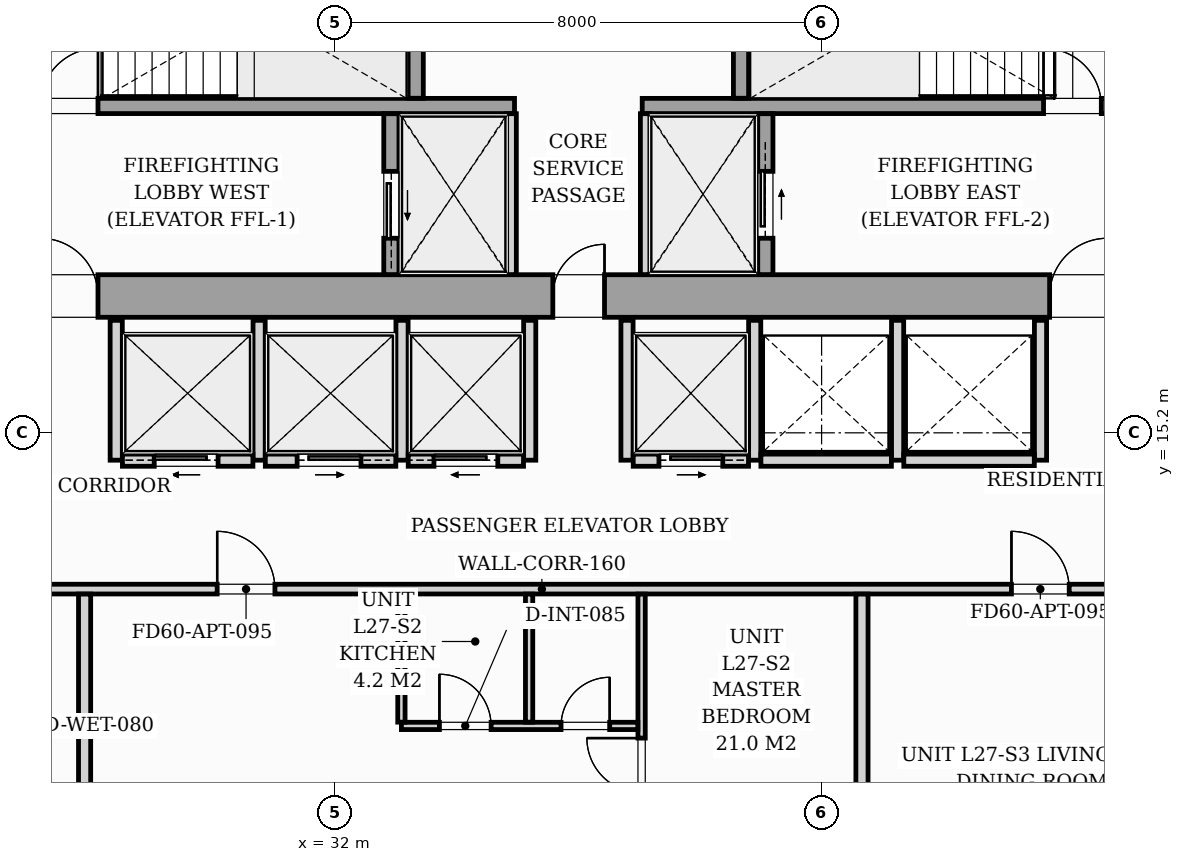
"""IFC4 building model, lengths in metres.
Left out: names, types, materials, properties, quantities, classifications, styles, units other than length and angle.
Written with IfcOpenShell. Run it as: python <this file> out.ifc"""

import sys

from ifc_helpers import new_model, si_unit, direction, frame, frame_2d, origin, origin_2d, place, context, subcontext, project, spatial, rectangle, i_section, extrude, source, transform, mapped, element, fill, save


model = new_model("IFC4")
c1 = context("Model", 3, precision=1e-05, world=origin(), true_north=direction((0.0, 1.0)))
c2 = subcontext(c1, "Body", "Model", "MODEL_VIEW")
j1 = project(units=[si_unit("LENGTHUNIT", "METRE"), si_unit("PLANEANGLEUNIT", "RADIAN")], contexts=[c1])
p1 = place(None, origin())
s1 = spatial("IfcSite", under=j1, at=p1, CompositionType="ELEMENT")
p2 = place(p1, origin())
s2 = spatial("IfcBuilding", under=s1, at=p2, CompositionType="ELEMENT")
p3 = place(p2, frame((0.0, 0.0, 97.0)))
s3 = spatial("IfcBuildingStorey", under=s2, at=p3, CompositionType="ELEMENT", Elevation=97.0)
m1 = source(origin(), c2, "Body", "SweptSolid", [
    extrude(i_section(OverallWidth=0.427, OverallDepth=0.483, WebThickness=0.051, FlangeThickness=0.082, FilletRadius=0.018, at=origin_2d()), origin(), (0.0, 0.0, 1.0), 3.196),
])
for number, where, z_axis, x_axis in (
    (1, (33.12, 17.4, 0.002), (0.0, 0.0, 1.0), (1.0, 0.0, 0.0)),
    (2, (38.88, 17.4, 0.002), (0.0, 0.0, 1.0), (1.0, 0.0, 0.0)),
):
    element("IfcColumn", number, at=place(p3, frame(where, z_axis=z_axis, x_axis=x_axis)), inside=s3, PredefinedType="PILASTER", context=c2, shape_type="MappedRepresentation", body=[
        mapped(m1, transform((0.0, 0.0, 0.0), scale=1.0)),
    ])
p4 = place(p3, frame((26.1, 17.45, 0.0), z_axis=(0.0, 0.0, 1.0), x_axis=(1.0, 0.0, 0.0)))
e3 = element("IfcWall", 3, at=p4, inside=s3, PredefinedType="SHEAR", context=c2, shape_type="SweptSolid", body=[
    extrude(rectangle(XDim=19.8, YDim=0.7, at=frame_2d((9.9, 0.0))), origin(), (0.0, 0.0, 1.0), 3.2),
])
p5 = place(p4, frame((1.05, 0.0, 0.0)))
e4 = element("IfcOpeningElement", 4, at=p5, cuts=e3, PredefinedType="OPENING", context=c2, shape_type="SweptSolid", body=[
    extrude(rectangle(XDim=0.95, YDim=2.06, at=frame_2d((0.475, 1.03))), frame((0.0, 0.36, 0.0), z_axis=(0.0, -1.0, 0.0), x_axis=(1.0, 0.0, 0.0)), (0.0, 0.0, 1.0), 0.72),
])
p6 = place(p4, frame((9.48, 0.0, 0.0)))
e5 = element("IfcOpeningElement", 5, at=p6, cuts=e3, PredefinedType="OPENING", context=c2, shape_type="SweptSolid", body=[
    extrude(rectangle(XDim=0.85, YDim=2.0, at=frame_2d((0.425, 1.0))), frame((0.0, 0.36, 0.0), z_axis=(0.0, -1.0, 0.0), x_axis=(1.0, 0.0, 0.0)), (0.0, 0.0, 1.0), 0.72),
])
p7 = place(p4, frame((17.65, 0.0, 0.0)))
e6 = element("IfcOpeningElement", 6, at=p7, cuts=e3, PredefinedType="OPENING", context=c2, shape_type="SweptSolid", body=[
    extrude(rectangle(XDim=0.95, YDim=2.06, at=frame_2d((0.475, 1.03))), frame((0.0, 0.36, 0.0), z_axis=(0.0, -1.0, 0.0), x_axis=(1.0, 0.0, 0.0)), (0.0, 0.0, 1.0), 0.72),
])
p8 = place(p3, frame((26.802, 20.575, 0.0), z_axis=(0.0, 0.0, 1.0), x_axis=(1.0, 0.0, 0.0)))
e7 = element("IfcWall", 7, at=p8, inside=s3, PredefinedType="SOLIDWALL", context=c2, shape_type="SweptSolid", body=[
    extrude(rectangle(XDim=8.148, YDim=0.25, at=frame_2d((4.074, 0.0))), origin(), (0.0, 0.0, 1.0), 3.2),
])
p9 = place(p8, frame((0.348, 0.0, 0.0)))
e8 = element("IfcOpeningElement", 8, at=p9, cuts=e7, PredefinedType="OPENING", context=c2, shape_type="SweptSolid", body=[
    extrude(rectangle(XDim=0.95, YDim=2.06, at=frame_2d((0.475, 1.03))), frame((0.0, 0.135, 0.0), z_axis=(0.0, -1.0, 0.0), x_axis=(1.0, 0.0, 0.0)), (0.0, 0.0, 1.0), 0.27),
])
p10 = place(p3, frame((37.05, 20.575, 0.0), z_axis=(0.0, 0.0, 1.0), x_axis=(1.0, 0.0, 0.0)))
e9 = element("IfcWall", 9, at=p10, inside=s3, PredefinedType="SOLIDWALL", context=c2, shape_type="SweptSolid", body=[
    extrude(rectangle(XDim=8.148, YDim=0.25, at=frame_2d((4.074, 0.0))), origin(), (0.0, 0.0, 1.0), 3.2),
])
p11 = place(p10, frame((6.6, 0.0, 0.0)))
e10 = element("IfcOpeningElement", 10, at=p11, cuts=e9, PredefinedType="OPENING", context=c2, shape_type="SweptSolid", body=[
    extrude(rectangle(XDim=0.95, YDim=2.06, at=frame_2d((0.475, 1.03))), frame((0.0, 0.135, 0.0), z_axis=(0.0, -1.0, 0.0), x_axis=(1.0, 0.0, 0.0)), (0.0, 0.0, 1.0), 0.27),
])
for number, where, z_axis, x_axis in (
    (11, (33.325, 20.702, 0.0), (0.0, 0.0, 1.0), (0.0, 1.0, 0.0)),
    (12, (38.675, 20.702, 0.0), (0.0, 0.0, 1.0), (0.0, 1.0, 0.0)),
):
    element("IfcWall", number, at=place(p3, frame(where, z_axis=z_axis, x_axis=x_axis)), inside=s3, PredefinedType="SOLIDWALL", context=c2, shape_type="SweptSolid", body=[
        extrude(rectangle(XDim=2.896, YDim=0.25, at=frame_2d((1.448, 0.0))), origin(), (0.0, 0.0, 1.0), 3.2),
    ])
p12 = place(p3, frame((32.925, 17.802, 0.0), z_axis=(0.0, 0.0, 1.0), x_axis=(0.0, 1.0, 0.0)))
e13 = element("IfcWall", 13, at=p12, inside=s3, PredefinedType="SOLIDWALL", context=c2, shape_type="SweptSolid", body=[
    extrude(rectangle(XDim=2.646, YDim=0.25, at=frame_2d((1.323, 0.0))), origin(), (0.0, 0.0, 1.0), 3.2),
])
p13 = place(p12, frame((0.598, 0.0, 0.0)))
e14 = element("IfcOpeningElement", 14, at=p13, cuts=e13, PredefinedType="OPENING", context=c2, shape_type="SweptSolid", body=[
    extrude(rectangle(XDim=1.1, YDim=2.08, at=frame_2d((0.55, 1.04))), frame((0.0, 0.135, 0.0), z_axis=(0.0, -1.0, 0.0), x_axis=(1.0, 0.0, 0.0)), (0.0, 0.0, 1.0), 0.27),
])
for number, where, z_axis, x_axis in (
    (15, (34.9, 17.802, 0.0), (0.0, 0.0, 1.0), (0.0, 1.0, 0.0)),
    (16, (37.1, 17.802, 0.0), (0.0, 0.0, 1.0), (0.0, 1.0, 0.0)),
):
    element("IfcWall", number, at=place(p3, frame(where, z_axis=z_axis, x_axis=x_axis)), inside=s3, PredefinedType="PARTITIONING", context=c2, shape_type="SweptSolid", body=[
        extrude(rectangle(XDim=2.646, YDim=0.16, at=frame_2d((1.323, 0.0))), origin(), (0.0, 0.0, 1.0), 2.94),
    ])
p14 = place(p3, frame((39.075, 17.802, 0.0), z_axis=(0.0, 0.0, 1.0), x_axis=(0.0, 1.0, 0.0)))
e17 = element("IfcWall", 17, at=p14, inside=s3, PredefinedType="SOLIDWALL", context=c2, shape_type="SweptSolid", body=[
    extrude(rectangle(XDim=2.646, YDim=0.25, at=frame_2d((1.323, 0.0))), origin(), (0.0, 0.0, 1.0), 3.2),
])
p15 = place(p14, frame((0.598, 0.0, 0.0)))
e18 = element("IfcOpeningElement", 18, at=p15, cuts=e17, PredefinedType="OPENING", context=c2, shape_type="SweptSolid", body=[
    extrude(rectangle(XDim=1.1, YDim=2.08, at=frame_2d((0.55, 1.04))), frame((0.0, 0.135, 0.0), z_axis=(0.0, -1.0, 0.0), x_axis=(1.0, 0.0, 0.0)), (0.0, 0.0, 1.0), 0.27),
])
for number, where, z_axis, x_axis in (
    (19, (28.4, 14.75, 0.0), (0.0, 0.0, 1.0), (0.0, 1.0, 0.0)),
    (20, (30.75, 14.75, 0.0), (0.0, 0.0, 1.0), (0.0, 1.0, 0.0)),
    (21, (33.1, 14.75, 0.0), (0.0, 0.0, 1.0), (0.0, 1.0, 0.0)),
):
    element("IfcWall", number, at=place(p3, frame(where, z_axis=z_axis, x_axis=x_axis)), inside=s3, PredefinedType="PARTITIONING", context=c2, shape_type="SweptSolid", body=[
        extrude(rectangle(XDim=2.3, YDim=0.2, at=frame_2d((1.15, 0.0))), origin(), (0.0, 0.0, 1.0), 2.94),
    ])
p16 = place(p3, frame((28.502, 14.75, 0.0), z_axis=(0.0, 0.0, 1.0), x_axis=(1.0, 0.0, 0.0)))
e22 = element("IfcWall", 22, at=p16, inside=s3, PredefinedType="PARTITIONING", context=c2, shape_type="SweptSolid", body=[
    extrude(rectangle(XDim=2.146, YDim=0.2, at=frame_2d((1.073, 0.0))), origin(), (0.0, 0.0, 1.0), 2.94),
])
p17 = place(p16, frame((0.523, 0.0, 0.0)))
e23 = element("IfcOpeningElement", 23, at=p17, cuts=e22, PredefinedType="OPENING", context=c2, shape_type="SweptSolid", body=[
    extrude(rectangle(XDim=1.05, YDim=2.08, at=frame_2d((0.525, 1.04))), frame((0.0, 0.11, 0.0), z_axis=(0.0, -1.0, 0.0), x_axis=(1.0, 0.0, 0.0)), (0.0, 0.0, 1.0), 0.22),
])
p18 = place(p3, frame((30.852, 14.75, 0.0), z_axis=(0.0, 0.0, 1.0), x_axis=(1.0, 0.0, 0.0)))
e24 = element("IfcWall", 24, at=p18, inside=s3, PredefinedType="PARTITIONING", context=c2, shape_type="SweptSolid", body=[
    extrude(rectangle(XDim=2.146, YDim=0.2, at=frame_2d((1.073, 0.0))), origin(), (0.0, 0.0, 1.0), 2.94),
])
p19 = place(p18, frame((0.523, 0.0, 0.0)))
e25 = element("IfcOpeningElement", 25, at=p19, cuts=e24, PredefinedType="OPENING", context=c2, shape_type="SweptSolid", body=[
    extrude(rectangle(XDim=1.05, YDim=2.08, at=frame_2d((0.525, 1.04))), frame((0.0, 0.11, 0.0), z_axis=(0.0, -1.0, 0.0), x_axis=(1.0, 0.0, 0.0)), (0.0, 0.0, 1.0), 0.22),
])
p20 = place(p3, frame((35.2, 14.75, 0.0), z_axis=(0.0, 0.0, 1.0), x_axis=(0.0, 1.0, 0.0)))
e26 = element("IfcWall", 26, at=p20, inside=s3, PredefinedType="PARTITIONING", context=c2, shape_type="SweptSolid", body=[
    extrude(rectangle(XDim=2.3, YDim=0.2, at=frame_2d((1.15, 0.0))), origin(), (0.0, 0.0, 1.0), 2.94),
])
p21 = place(p3, frame((33.202, 14.75, 0.0), z_axis=(0.0, 0.0, 1.0), x_axis=(1.0, 0.0, 0.0)))
e27 = element("IfcWall", 27, at=p21, inside=s3, PredefinedType="PARTITIONING", context=c2, shape_type="SweptSolid", body=[
    extrude(rectangle(XDim=1.896, YDim=0.2, at=frame_2d((0.948, 0.0))), origin(), (0.0, 0.0, 1.0), 2.94),
])
p22 = place(p21, frame((0.423, 0.0, 0.0)))
e28 = element("IfcOpeningElement", 28, at=p22, cuts=e27, PredefinedType="OPENING", context=c2, shape_type="SweptSolid", body=[
    extrude(rectangle(XDim=1.05, YDim=2.08, at=frame_2d((0.525, 1.04))), frame((0.0, 0.11, 0.0), z_axis=(0.0, -1.0, 0.0), x_axis=(1.0, 0.0, 0.0)), (0.0, 0.0, 1.0), 0.22),
])
for number, where, z_axis, x_axis in (
    (29, (36.8, 14.75, 0.0), (0.0, 0.0, 1.0), (0.0, 1.0, 0.0)),
    (30, (38.9, 14.75, 0.0), (0.0, 0.0, 1.0), (0.0, 1.0, 0.0)),
):
    element("IfcWall", number, at=place(p3, frame(where, z_axis=z_axis, x_axis=x_axis)), inside=s3, PredefinedType="PARTITIONING", context=c2, shape_type="SweptSolid", body=[
        extrude(rectangle(XDim=2.3, YDim=0.2, at=frame_2d((1.15, 0.0))), origin(), (0.0, 0.0, 1.0), 2.94),
    ])
p23 = place(p3, frame((36.902, 14.75, 0.0), z_axis=(0.0, 0.0, 1.0), x_axis=(1.0, 0.0, 0.0)))
e31 = element("IfcWall", 31, at=p23, inside=s3, PredefinedType="PARTITIONING", context=c2, shape_type="SweptSolid", body=[
    extrude(rectangle(XDim=1.896, YDim=0.2, at=frame_2d((0.948, 0.0))), origin(), (0.0, 0.0, 1.0), 2.94),
])
p24 = place(p23, frame((0.423, 0.0, 0.0)))
e32 = element("IfcOpeningElement", 32, at=p24, cuts=e31, PredefinedType="OPENING", context=c2, shape_type="SweptSolid", body=[
    extrude(rectangle(XDim=1.05, YDim=2.08, at=frame_2d((0.525, 1.04))), frame((0.0, 0.11, 0.0), z_axis=(0.0, -1.0, 0.0), x_axis=(1.0, 0.0, 0.0)), (0.0, 0.0, 1.0), 0.22),
])
for number, where, z_axis, x_axis in (
    (33, (41.25, 14.75, 0.0), (0.0, 0.0, 1.0), (0.0, 1.0, 0.0)),
    (34, (43.6, 14.75, 0.0), (0.0, 0.0, 1.0), (0.0, 1.0, 0.0)),
):
    element("IfcWall", number, at=place(p3, frame(where, z_axis=z_axis, x_axis=x_axis)), inside=s3, PredefinedType="PARTITIONING", context=c2, shape_type="SweptSolid", body=[
        extrude(rectangle(XDim=2.3, YDim=0.2, at=frame_2d((1.15, 0.0))), origin(), (0.0, 0.0, 1.0), 2.94),
    ])
for number, where, z_axis, x_axis in (
    (35, (39.002, 14.75, 0.0), (0.0, 0.0, 1.0), (1.0, 0.0, 0.0)),
    (36, (41.352, 14.75, 0.0), (0.0, 0.0, 1.0), (1.0, 0.0, 0.0)),
):
    element("IfcWall", number, at=place(p3, frame(where, z_axis=z_axis, x_axis=x_axis)), inside=s3, PredefinedType="PARTITIONING", context=c2, shape_type="SweptSolid", body=[
        extrude(rectangle(XDim=2.146, YDim=0.2, at=frame_2d((1.073, 0.0))), origin(), (0.0, 0.0, 1.0), 2.94),
    ])
p25 = place(p3, frame((16.6, 12.63, 0.0), z_axis=(0.0, 0.0, 1.0), x_axis=(1.0, 0.0, 0.0)))
e37 = element("IfcWall", 37, at=p25, inside=s3, PredefinedType="PARTITIONING", context=c2, shape_type="SweptSolid", body=[
    extrude(rectangle(XDim=37.6, YDim=0.16, at=frame_2d((18.8, 0.0))), origin(), (0.0, 0.0, 1.0), 2.94),
])
p26 = place(p25, frame((1.626, 0.0, 0.0)))
e38 = element("IfcOpeningElement", 38, at=p26, cuts=e37, PredefinedType="OPENING", context=c2, shape_type="SweptSolid", body=[
    extrude(rectangle(XDim=0.95, YDim=2.06, at=frame_2d((0.475, 1.03))), frame((0.0, 0.09, 0.0), z_axis=(0.0, -1.0, 0.0), x_axis=(1.0, 0.0, 0.0)), (0.0, 0.0, 1.0), 0.18),
])
p27 = place(p25, frame((13.46, 0.0, 0.0)))
e39 = element("IfcOpeningElement", 39, at=p27, cuts=e37, PredefinedType="OPENING", context=c2, shape_type="SweptSolid", body=[
    extrude(rectangle(XDim=0.95, YDim=2.06, at=frame_2d((0.475, 1.03))), frame((0.0, 0.09, 0.0), z_axis=(0.0, -1.0, 0.0), x_axis=(1.0, 0.0, 0.0)), (0.0, 0.0, 1.0), 0.18),
])
p28 = place(p25, frame((26.522, 0.0, 0.0)))
e40 = element("IfcOpeningElement", 40, at=p28, cuts=e37, PredefinedType="OPENING", context=c2, shape_type="SweptSolid", body=[
    extrude(rectangle(XDim=0.95, YDim=2.06, at=frame_2d((0.475, 1.03))), frame((0.0, 0.09, 0.0), z_axis=(0.0, -1.0, 0.0), x_axis=(1.0, 0.0, 0.0)), (0.0, 0.0, 1.0), 0.18),
])
p29 = place(p3, frame((27.88, 5.427, 0.0), z_axis=(0.0, 0.0, 1.0), x_axis=(0.0, 1.0, 0.0)))
e41 = element("IfcWall", 41, at=p29, inside=s3, PredefinedType="PARTITIONING", context=c2, shape_type="SweptSolid", body=[
    extrude(rectangle(XDim=7.121, YDim=0.2, at=frame_2d((3.561, 0.0))), origin(), (0.0, 0.0, 1.0), 2.94),
])
p30 = place(p3, frame((37.04, 6.126, 0.0), z_axis=(0.0, 0.0, 1.0), x_axis=(0.0, 1.0, 0.0)))
e42 = element("IfcWall", 42, at=p30, inside=s3, PredefinedType="PARTITIONING", context=c2, shape_type="SweptSolid", body=[
    extrude(rectangle(XDim=6.422, YDim=0.12, at=frame_2d((3.211, 0.0))), origin(), (0.0, 0.0, 1.0), 2.94),
])
p31 = place(p30, frame((3.154, 0.0, 0.0)))
e43 = element("IfcOpeningElement", 43, at=p31, cuts=e42, PredefinedType="OPENING", context=c2, shape_type="SweptSolid", body=[
    extrude(rectangle(XDim=0.9, YDim=2.05, at=frame_2d((0.45, 1.025))), frame((0.0, 0.07, 0.0), z_axis=(0.0, -1.0, 0.0), x_axis=(1.0, 0.0, 0.0)), (0.0, 0.0, 1.0), 0.14),
])
p32 = place(p3, frame((33.09, 10.38, 0.0), z_axis=(0.0, 0.0, 1.0), x_axis=(1.0, 0.0, 0.0)))
e44 = element("IfcWall", 44, at=p32, inside=s3, PredefinedType="PARTITIONING", context=c2, shape_type="SweptSolid", body=[
    extrude(rectangle(XDim=3.888, YDim=0.12, at=frame_2d((1.944, 0.0))), origin(), (0.0, 0.0, 1.0), 2.94),
])
p33 = place(p32, frame((0.625, 0.0, 0.0)))
e45 = element("IfcOpeningElement", 45, at=p33, cuts=e44, PredefinedType="OPENING", context=c2, shape_type="SweptSolid", body=[
    extrude(rectangle(XDim=0.85, YDim=2.05, at=frame_2d((0.425, 1.025))), frame((0.0, 0.07, 0.0), z_axis=(0.0, -1.0, 0.0), x_axis=(1.0, 0.0, 0.0)), (0.0, 0.0, 1.0), 0.14),
])
p34 = place(p32, frame((2.625, 0.0, 0.0)))
e46 = element("IfcOpeningElement", 46, at=p34, cuts=e44, PredefinedType="OPENING", context=c2, shape_type="SweptSolid", body=[
    extrude(rectangle(XDim=0.8, YDim=2.02, at=frame_2d((0.4, 1.01))), frame((0.0, 0.07, 0.0), z_axis=(0.0, -1.0, 0.0), x_axis=(1.0, 0.0, 0.0)), (0.0, 0.0, 1.0), 0.14),
])
for number, where, z_axis, x_axis in (
    (47, (35.19, 10.442, 0.0), (0.0, 0.0, 1.0), (0.0, 1.0, 0.0)),
    (48, (33.09, 10.442, 0.0), (0.0, 0.0, 1.0), (0.0, 1.0, 0.0)),
):
    element("IfcWall", number, at=place(p3, frame(where, z_axis=z_axis, x_axis=x_axis)), inside=s3, PredefinedType="PARTITIONING", context=c2, shape_type="SweptSolid", body=[
        extrude(rectangle(XDim=2.106, YDim=0.12, at=frame_2d((1.053, 0.0))), origin(), (0.0, 0.0, 1.0), 2.94),
    ])
p35 = place(p3, frame((40.664, 6.475, 0.0), z_axis=(0.0, 0.0, 1.0), x_axis=(0.0, 1.0, 0.0)))
e49 = element("IfcWall", 49, at=p35, inside=s3, PredefinedType="PARTITIONING", context=c2, shape_type="SweptSolid", body=[
    extrude(rectangle(XDim=6.073, YDim=0.2, at=frame_2d((3.037, 0.0))), origin(), (0.0, 0.0, 1.0), 2.94),
])
m2 = source(origin(), c2, "Body", "SweptSolid", [
    extrude(rectangle(XDim=0.95, YDim=2.06, at=frame_2d((0.475, 1.03))), frame((0.0, 0.025, 0.0), z_axis=(0.0, -1.0, 0.0), x_axis=(1.0, 0.0, 0.0)), (0.0, 0.0, 1.0), 0.05),
])
p36 = place(p5, origin())
e50 = element("IfcDoor", 50, at=p36, inside=s3, OperationType="SINGLE_SWING_LEFT", PredefinedType="DOOR", context=c2, shape_type="MappedRepresentation", body=[
    mapped(m2, transform((0.0, 0.0, 0.0), scale=1.0)),
])
fill(e4, e50)
m3 = source(origin(), c2, "Body", "SweptSolid", [
    extrude(rectangle(XDim=0.85, YDim=2.0, at=frame_2d((0.425, 1.0))), frame((0.0, 0.025, 0.0), z_axis=(0.0, -1.0, 0.0), x_axis=(1.0, 0.0, 0.0)), (0.0, 0.0, 1.0), 0.05),
])
p37 = place(p6, origin())
e51 = element("IfcDoor", 51, at=p37, inside=s3, OperationType="SINGLE_SWING_RIGHT", PredefinedType="DOOR", context=c2, shape_type="MappedRepresentation", body=[
    mapped(m3, transform((0.0, 0.0, 0.0), scale=1.0)),
])
fill(e5, e51)
p38 = place(p7, origin())
e52 = element("IfcDoor", 52, at=p38, inside=s3, OperationType="SINGLE_SWING_RIGHT", PredefinedType="DOOR", context=c2, shape_type="MappedRepresentation", body=[
    mapped(m2, transform((0.0, 0.0, 0.0), scale=1.0)),
])
fill(e6, e52)
p39 = place(p9, origin())
e53 = element("IfcDoor", 53, at=p39, inside=s3, OperationType="SINGLE_SWING_RIGHT", PredefinedType="DOOR", context=c2, shape_type="MappedRepresentation", body=[
    mapped(m2, transform((0.0, 0.0, 0.0), scale=1.0)),
])
fill(e8, e53)
p40 = place(p11, origin())
e54 = element("IfcDoor", 54, at=p40, inside=s3, OperationType="SINGLE_SWING_LEFT", PredefinedType="DOOR", context=c2, shape_type="MappedRepresentation", body=[
    mapped(m2, transform((0.0, 0.0, 0.0), scale=1.0)),
])
fill(e10, e54)
m4 = source(origin(), c2, "Body", "SweptSolid", [
    extrude(rectangle(XDim=1.1, YDim=2.08, at=frame_2d((0.55, 1.04))), frame((0.0, 0.025, 0.0), z_axis=(0.0, -1.0, 0.0), x_axis=(1.0, 0.0, 0.0)), (0.0, 0.0, 1.0), 0.05),
])
p41 = place(p13, origin())
e55 = element("IfcDoor", 55, at=p41, inside=s3, OperationType="SLIDING_TO_LEFT", PredefinedType="DOOR", context=c2, shape_type="MappedRepresentation", body=[
    mapped(m4, transform((0.0, 0.0, 0.0), scale=1.0)),
])
fill(e14, e55)
p42 = place(p15, origin())
e56 = element("IfcDoor", 56, at=p42, inside=s3, OperationType="SLIDING_TO_RIGHT", PredefinedType="DOOR", context=c2, shape_type="MappedRepresentation", body=[
    mapped(m4, transform((0.0, 0.0, 0.0), scale=1.0)),
])
fill(e18, e56)
m5 = source(origin(), c2, "Body", "SweptSolid", [
    extrude(rectangle(XDim=1.05, YDim=2.08, at=frame_2d((0.525, 1.04))), frame((0.0, 0.025, 0.0), z_axis=(0.0, -1.0, 0.0), x_axis=(1.0, 0.0, 0.0)), (0.0, 0.0, 1.0), 0.05),
])
p43 = place(p17, origin())
e57 = element("IfcDoor", 57, at=p43, inside=s3, OperationType="SLIDING_TO_LEFT", PredefinedType="DOOR", context=c2, shape_type="MappedRepresentation", body=[
    mapped(m5, transform((0.0, 0.0, 0.0), scale=1.0)),
])
fill(e23, e57)
p44 = place(p19, origin())
e58 = element("IfcDoor", 58, at=p44, inside=s3, OperationType="SLIDING_TO_RIGHT", PredefinedType="DOOR", context=c2, shape_type="MappedRepresentation", body=[
    mapped(m5, transform((0.0, 0.0, 0.0), scale=1.0)),
])
fill(e25, e58)
p45 = place(p22, origin())
e59 = element("IfcDoor", 59, at=p45, inside=s3, OperationType="SLIDING_TO_LEFT", PredefinedType="DOOR", context=c2, shape_type="MappedRepresentation", body=[
    mapped(m5, transform((0.0, 0.0, 0.0), scale=1.0)),
])
fill(e28, e59)
p46 = place(p24, origin())
e60 = element("IfcDoor", 60, at=p46, inside=s3, OperationType="SLIDING_TO_RIGHT", PredefinedType="DOOR", context=c2, shape_type="MappedRepresentation", body=[
    mapped(m5, transform((0.0, 0.0, 0.0), scale=1.0)),
])
fill(e32, e60)
m6 = source(origin(), c2, "Body", "SweptSolid", [
    extrude(rectangle(XDim=0.95, YDim=2.06, at=frame_2d((0.475, 1.03))), frame((0.0, 0.025, 0.0), z_axis=(0.0, -1.0, 0.0), x_axis=(1.0, 0.0, 0.0)), (0.0, 0.0, 1.0), 0.05),
])
p47 = place(p27, origin())
e61 = element("IfcDoor", 61, at=p47, inside=s3, OperationType="SINGLE_SWING_LEFT", PredefinedType="DOOR", context=c2, shape_type="MappedRepresentation", body=[
    mapped(m6, transform((0.0, 0.0, 0.0), scale=1.0)),
])
fill(e39, e61)
m7 = source(origin(), c2, "Body", "SweptSolid", [
    extrude(rectangle(XDim=0.9, YDim=2.05, at=frame_2d((0.45, 1.025))), frame((0.0, 0.025, 0.0), z_axis=(0.0, -1.0, 0.0), x_axis=(1.0, 0.0, 0.0)), (0.0, 0.0, 1.0), 0.05),
])
p48 = place(p31, origin())
e62 = element("IfcDoor", 62, at=p48, inside=s3, OperationType="SINGLE_SWING_RIGHT", PredefinedType="DOOR", context=c2, shape_type="MappedRepresentation", body=[
    mapped(m7, transform((0.0, 0.0, 0.0), scale=1.0)),
])
fill(e43, e62)
m8 = source(origin(), c2, "Body", "SweptSolid", [
    extrude(rectangle(XDim=0.85, YDim=2.05, at=frame_2d((0.425, 1.025))), frame((0.0, 0.025, 0.0), z_axis=(0.0, -1.0, 0.0), x_axis=(1.0, 0.0, 0.0)), (0.0, 0.0, 1.0), 0.05),
])
p49 = place(p33, origin())
e63 = element("IfcDoor", 63, at=p49, inside=s3, OperationType="SINGLE_SWING_LEFT", PredefinedType="DOOR", context=c2, shape_type="MappedRepresentation", body=[
    mapped(m8, transform((0.0, 0.0, 0.0), scale=1.0)),
])
fill(e45, e63)
m9 = source(origin(), c2, "Body", "SweptSolid", [
    extrude(rectangle(XDim=0.8, YDim=2.02, at=frame_2d((0.4, 1.01))), frame((0.0, 0.025, 0.0), z_axis=(0.0, -1.0, 0.0), x_axis=(1.0, 0.0, 0.0)), (0.0, 0.0, 1.0), 0.05),
])
p50 = place(p34, origin())
e64 = element("IfcDoor", 64, at=p50, inside=s3, OperationType="SINGLE_SWING_RIGHT", PredefinedType="DOOR", context=c2, shape_type="MappedRepresentation", body=[
    mapped(m9, transform((0.0, 0.0, 0.0), scale=1.0)),
])
fill(e46, e64)
p51 = place(p28, origin())
e65 = element("IfcDoor", 65, at=p51, inside=s3, OperationType="SINGLE_SWING_LEFT", PredefinedType="DOOR", context=c2, shape_type="MappedRepresentation", body=[
    mapped(m6, transform((0.0, 0.0, 0.0), scale=1.0)),
])
fill(e40, e65)
save(model, sys.argv[1])
